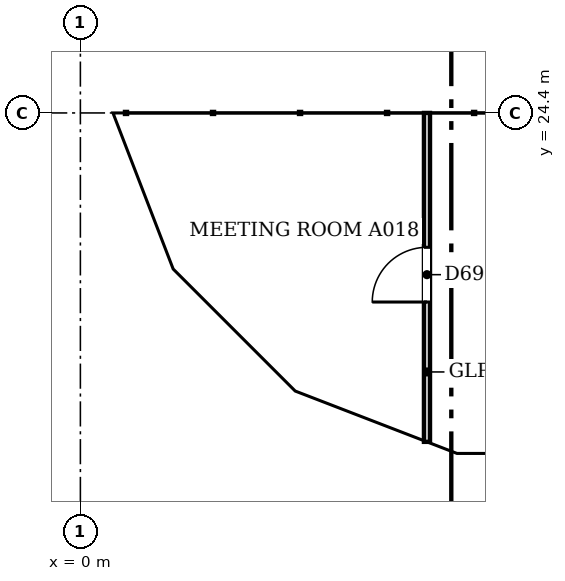
"""IFC4 building model, lengths in metres.
Left out: names, types, materials, properties, quantities, classifications, styles, units other than length and angle.
Written with IfcOpenShell. Run it as: python <this file> out.ifc"""

import sys

from ifc_helpers import new_model, si_unit, direction, frame, frame_2d, origin, place, context, subcontext, project, spatial, polyline, rectangle, outline, extrude, faceted_brep, source, transform, mapped, element, fill, save


model = new_model("IFC4")
c1 = context("Model", 3, precision=1e-05, world=origin(), true_north=direction((0.0, 1.0)))
c2 = subcontext(c1, "Body", "Model", "MODEL_VIEW")
j1 = project(units=[si_unit("LENGTHUNIT", "METRE"), si_unit("PLANEANGLEUNIT", "RADIAN")], contexts=[c1])
p1 = place(None, origin())
s1 = spatial("IfcSite", under=j1, at=p1, CompositionType="ELEMENT")
p2 = place(p1, origin())
s2 = spatial("IfcBuilding", under=s1, at=p2, CompositionType="ELEMENT")
p3 = place(p2, frame((0.0, 0.0, 112.6)))
s3 = spatial("IfcBuildingStorey", under=s2, at=p3, CompositionType="ELEMENT", Elevation=112.6)
m1 = source(origin(), c2, "Body", "Brep", [
    faceted_brep([(6.053, -0.25, 0.0), (3.05, -0.25, 3.8), (0.0, -0.25, 0.0), (0.0, 0.25, 0.0), (3.05, 0.25, 3.8), (6.007, 0.25, 0.059), (6.007, 0.25, 0.0), (6.053, 0.0, 0.0)], [[[0, 1, 2]], [[3, 4, 5, 6]], [[5, 4, 1, 0, 7]], [[4, 3, 2, 1]], [[3, 6, 7, 0, 2]], [[7, 6, 5]]]),
])
p4 = place(p3, frame((0.25, 30.5, 0.0), z_axis=(0.0, 0.0, 1.0), x_axis=(0.0, -1.0, 0.0)))
e1 = element("IfcWall", 1, at=p4, inside=s3, PredefinedType="SOLIDWALL", context=c2, shape_type="MappedRepresentation", body=[
    mapped(m1, transform((0.0, 0.0, 0.0), scale=1.0)),
])
m2 = source(origin(), c2, "Body", "SweptSolid", [
    extrude(outline(polyline([(5.537, 0.25), (3.049, 3.399), (0.521, 0.25), (5.537, 0.25)])), frame((0.0, 0.26, 0.0), z_axis=(0.0, -1.0, 0.0), x_axis=(1.0, 0.0, 0.0)), (0.0, 0.0, 1.0), 0.52),
])
p5 = place(p4, origin())
e2 = element("IfcOpeningElement", 2, at=p5, cuts=e1, PredefinedType="OPENING", context=c2, shape_type="MappedRepresentation", body=[
    mapped(m2, transform((0.0, 0.0, 0.0), scale=1.0)),
])
m3 = source(origin(), c2, "Body", "Brep", [
    faceted_brep([(3.003, -0.25, 3.731), (2.95, -0.25, 3.8), (0.0, -0.25, 0.0), (3.003, -0.25, 0.0), (0.047, 0.25, 0.06), (2.898, 0.25, 3.732), (2.898, 0.25, 0.0), (0.047, 0.25, 0.0), (2.95, 0.0, 3.8), (0.0, 0.0, 0.0)], [[[0, 1, 2, 3]], [[4, 5, 6, 7]], [[8, 1, 0]], [[5, 4, 9, 2, 1, 8]], [[7, 6, 3, 2, 9]], [[7, 9, 4]], [[3, 6, 5, 8, 0]]]),
])
p6 = place(p3, frame((0.25, 24.447, 0.0), z_axis=(0.0, 0.0, 1.0), x_axis=(0.35992665181, -0.932980602862, 0.0)))
e3 = element("IfcWall", 3, at=p6, inside=s3, PredefinedType="SOLIDWALL", context=c2, shape_type="MappedRepresentation", body=[
    mapped(m3, transform((0.0, 0.0, 0.0), scale=1.0)),
])
m4 = source(origin(), c2, "Body", "SweptSolid", [
    extrude(outline(polyline([(2.75, 3.135), (0.511, 0.25), (2.75, 0.25), (2.75, 3.135)])), frame((0.0, 0.26, 0.0), z_axis=(0.0, -1.0, 0.0), x_axis=(1.0, 0.0, 0.0)), (0.0, 0.0, 1.0), 0.52),
])
p7 = place(p6, origin())
e4 = element("IfcOpeningElement", 4, at=p7, cuts=e3, PredefinedType="OPENING", context=c2, shape_type="MappedRepresentation", body=[
    mapped(m4, transform((0.0, 0.0, 0.0), scale=1.0)),
])
m5 = source(origin(), c2, "Body", "Brep", [
    faceted_brep([(2.997, -0.25, 0.0), (0.053, -0.25, 3.8), (0.0, -0.25, 3.732), (0.0, -0.25, 0.0), (0.106, 0.25, 3.731), (2.944, 0.25, 0.068), (2.944, 0.25, 0.0), (0.106, 0.25, 0.0), (0.053, 0.0, 3.8), (2.997, 0.0, 0.0)], [[[0, 1, 2, 3]], [[4, 5, 6, 7]], [[5, 4, 8, 1, 0, 9]], [[2, 1, 8]], [[7, 6, 9, 0, 3]], [[7, 3, 2, 8, 4]], [[9, 6, 5]]]),
])
p8 = place(p3, frame((1.274, 21.731, 0.0), z_axis=(0.0, 0.0, 1.0), x_axis=(0.707147509625, -0.707066050402, 0.0)))
e5 = element("IfcWall", 5, at=p8, inside=s3, PredefinedType="SOLIDWALL", context=c2, shape_type="MappedRepresentation", body=[
    mapped(m5, transform((0.0, 0.0, 0.0), scale=1.0)),
])
m6 = source(origin(), c2, "Body", "SweptSolid", [
    extrude(outline(polyline([(2.487, 0.25), (0.253, 3.134), (0.253, 0.25), (2.487, 0.25)])), frame((0.0, 0.26, 0.0), z_axis=(0.0, -1.0, 0.0), x_axis=(1.0, 0.0, 0.0)), (0.0, 0.0, 1.0), 0.52),
])
p9 = place(p8, origin())
e6 = element("IfcOpeningElement", 6, at=p9, cuts=e5, PredefinedType="OPENING", context=c2, shape_type="MappedRepresentation", body=[
    mapped(m6, transform((0.0, 0.0, 0.0), scale=1.0)),
])
m7 = source(origin(), c2, "Body", "Brep", [
    faceted_brep([(2.997, -0.25, 3.741), (2.95, -0.25, 3.8), (0.0, -0.25, 0.0), (2.997, -0.25, 0.0), (0.053, 0.25, 0.068), (2.904, 0.25, 3.74), (2.904, 0.25, 0.0), (0.053, 0.25, 0.0), (2.95, 0.0, 3.8), (0.0, 0.0, 0.0)], [[[0, 1, 2, 3]], [[4, 5, 6, 7]], [[8, 1, 0]], [[5, 4, 9, 2, 1, 8]], [[7, 6, 3, 2, 9]], [[7, 9, 4]], [[3, 6, 5, 8, 0]]]),
])
p10 = place(p3, frame((3.394, 19.612, 0.0), z_axis=(0.0, 0.0, 1.0), x_axis=(0.932990326376, -0.359901446078, 0.0)))
e7 = element("IfcWall", 7, at=p10, inside=s3, PredefinedType="SOLIDWALL", context=c2, shape_type="MappedRepresentation", body=[
    mapped(m7, transform((0.0, 0.0, 0.0), scale=1.0)),
])
p11 = place(p10, origin())
e8 = element("IfcOpeningElement", 8, at=p11, cuts=e7, PredefinedType="OPENING", context=c2, shape_type="MappedRepresentation", body=[
    mapped(m4, transform((0.0, 0.0, 0.0), scale=1.0)),
])
m8 = source(origin(), c2, "Body", "Brep", [
    faceted_brep([(3.05, -0.25, 0.0), (0.047, -0.25, 3.8), (0.0, -0.25, 3.74), (0.0, -0.25, 0.0), (0.093, 0.25, 3.741), (3.05, 0.25, 0.0), (0.093, 0.25, 0.0), (0.047, 0.0, 3.8)], [[[0, 1, 2, 3]], [[4, 5, 6]], [[5, 4, 7, 1, 0]], [[2, 1, 7]], [[6, 5, 0, 3]], [[6, 3, 2, 7, 4]]]),
])
p12 = place(p3, frame((6.1, 18.55, 0.0), z_axis=(0.0, 0.0, 1.0), x_axis=(1.0, 0.0, 0.0)))
e9 = element("IfcWall", 9, at=p12, inside=s3, PredefinedType="SOLIDWALL", context=c2, shape_type="MappedRepresentation", body=[
    mapped(m8, transform((0.0, 0.0, 0.0), scale=1.0)),
])
m9 = source(origin(), c2, "Body", "SweptSolid", [
    extrude(outline(polyline([(2.534, 0.25), (0.247, 3.144), (0.247, 0.25), (2.534, 0.25)])), frame((0.0, 0.26, 0.0), z_axis=(0.0, -1.0, 0.0), x_axis=(1.0, 0.0, 0.0)), (0.0, 0.0, 1.0), 0.52),
])
p13 = place(p12, origin())
e10 = element("IfcOpeningElement", 10, at=p13, cuts=e9, PredefinedType="OPENING", context=c2, shape_type="MappedRepresentation", body=[
    mapped(m9, transform((0.0, 0.0, 0.0), scale=1.0)),
])
p14 = place(p2, frame((0.0, 0.0, 116.4)))
s4 = spatial("IfcBuildingStorey", under=s2, at=p14, CompositionType="ELEMENT", Elevation=116.4)
m10 = source(origin(), c2, "Body", "Brep", [
    faceted_brep([(3.003, -0.25, 0.0), (3.05, -0.25, 0.06), (3.05, -0.25, 7.54), (3.003, -0.25, 7.6), (0.0, -0.25, 3.8), (0.0, 0.25, 3.8), (2.957, 0.25, 7.541), (2.957, 0.25, 0.059), (3.003, 0.0, 0.0), (3.003, 0.0, 7.6)], [[[0, 1, 2, 3, 4]], [[5, 6, 7]], [[1, 0, 8]], [[9, 3, 2]], [[6, 5, 4, 3, 9]], [[5, 7, 8, 0, 4]], [[1, 8, 7, 6, 9, 2]]]),
])
p15 = place(p14, frame((0.25, 27.45, -3.8), z_axis=(0.0, 0.0, 1.0), x_axis=(0.0, -1.0, 0.0)))
e11 = element("IfcWall", 11, at=p15, inside=s4, PredefinedType="SOLIDWALL", context=c2, shape_type="MappedRepresentation", body=[
    mapped(m10, transform((0.0, 0.0, 0.0), scale=1.0)),
])
m11 = source(origin(), c2, "Body", "SweptSolid", [
    extrude(outline(polyline([(2.803, 6.944), (0.319, 3.8), (2.803, 0.656), (2.803, 6.944)])), frame((0.0, 0.26, 0.0), z_axis=(0.0, -1.0, 0.0), x_axis=(1.0, 0.0, 0.0)), (0.0, 0.0, 1.0), 0.52),
])
p16 = place(p15, origin())
e12 = element("IfcOpeningElement", 12, at=p16, cuts=e11, PredefinedType="OPENING", context=c2, shape_type="MappedRepresentation", body=[
    mapped(m11, transform((0.0, 0.0, 0.0), scale=1.0)),
])
m12 = source(origin(), c2, "Body", "Brep", [
    faceted_brep([(0.047, -0.25, 0.0), (2.997, -0.25, 3.8), (0.047, -0.25, 7.6), (0.0, -0.25, 7.541), (0.0, -0.25, 0.059), (0.093, 0.25, 7.54), (2.944, 0.25, 3.868), (2.944, 0.25, 3.732), (0.093, 0.25, 0.06), (2.997, 0.0, 3.8), (0.047, 0.0, 0.0), (0.047, 0.0, 7.6)], [[[0, 1, 2, 3, 4]], [[5, 6, 7, 8]], [[8, 7, 9, 1, 0, 10]], [[6, 5, 11, 2, 1, 9]], [[3, 2, 11]], [[10, 0, 4]], [[8, 10, 4, 3, 11, 5]], [[9, 7, 6]]]),
])
p17 = place(p14, frame((0.233, 24.49, -3.8), z_axis=(0.0, 0.0, 1.0), x_axis=(0.359901446078, -0.932990326376, 0.0)))
e13 = element("IfcWall", 13, at=p17, inside=s4, PredefinedType="SOLIDWALL", context=c2, shape_type="MappedRepresentation", body=[
    mapped(m12, transform((0.0, 0.0, 0.0), scale=1.0)),
])
m13 = source(origin(), c2, "Body", "SweptSolid", [
    extrude(outline(polyline([(0.247, 0.665), (2.681, 3.8), (0.247, 6.935), (0.247, 0.665)])), frame((0.0, 0.26, 0.0), z_axis=(0.0, -1.0, 0.0), x_axis=(1.0, 0.0, 0.0)), (0.0, 0.0, 1.0), 0.52),
])
p18 = place(p17, origin())
e14 = element("IfcOpeningElement", 14, at=p18, cuts=e13, PredefinedType="OPENING", context=c2, shape_type="MappedRepresentation", body=[
    mapped(m13, transform((0.0, 0.0, 0.0), scale=1.0)),
])
m14 = source(origin(), c2, "Body", "Brep", [
    faceted_brep([(2.944, -0.25, 0.0), (2.997, -0.25, 0.068), (2.997, -0.25, 7.532), (2.944, -0.25, 7.6), (0.0, -0.25, 3.8), (0.053, 0.25, 3.868), (2.891, 0.25, 7.532), (2.891, 0.25, 0.068), (0.053, 0.25, 3.731), (2.944, 0.0, 0.0), (2.944, 0.0, 7.6), (0.0, 0.0, 3.8)], [[[0, 1, 2, 3, 4]], [[5, 6, 7, 8]], [[1, 0, 9]], [[10, 3, 2]], [[6, 5, 11, 4, 3, 10]], [[8, 7, 9, 0, 4, 11]], [[8, 11, 5]], [[1, 9, 7, 6, 10, 2]]]),
])
p19 = place(p14, frame((1.312, 21.694, -3.8), z_axis=(0.0, 0.0, 1.0), x_axis=(0.707066050402, -0.707147509625, 0.0)))
e15 = element("IfcWall", 15, at=p19, inside=s4, PredefinedType="SOLIDWALL", context=c2, shape_type="MappedRepresentation", body=[
    mapped(m14, transform((0.0, 0.0, 0.0), scale=1.0)),
])
m15 = source(origin(), c2, "Body", "SweptSolid", [
    extrude(outline(polyline([(2.744, 6.934), (0.316, 3.8), (2.744, 0.666), (2.744, 6.934)])), frame((0.0, 0.26, 0.0), z_axis=(0.0, -1.0, 0.0), x_axis=(1.0, 0.0, 0.0)), (0.0, 0.0, 1.0), 0.52),
])
p20 = place(p19, origin())
e16 = element("IfcOpeningElement", 16, at=p20, cuts=e15, PredefinedType="OPENING", context=c2, shape_type="MappedRepresentation", body=[
    mapped(m15, transform((0.0, 0.0, 0.0), scale=1.0)),
])
m16 = source(origin(), c2, "Body", "Brep", [
    faceted_brep([(0.053, -0.25, 0.0), (3.003, -0.25, 3.8), (0.053, -0.25, 7.6), (0.0, -0.25, 7.531), (0.0, -0.25, 0.068), (0.106, 0.25, 7.532), (2.957, 0.25, 3.86), (2.957, 0.25, 3.74), (0.106, 0.25, 0.068), (3.003, 0.0, 3.8), (0.053, 0.0, 0.0), (0.053, 0.0, 7.6)], [[[0, 1, 2, 3, 4]], [[5, 6, 7, 8]], [[8, 7, 9, 1, 0, 10]], [[6, 5, 11, 2, 1, 9]], [[3, 2, 11]], [[10, 0, 4]], [[8, 10, 4, 3, 11, 5]], [[9, 7, 6]]]),
])
p21 = place(p14, frame((3.344, 19.631, -3.8), z_axis=(0.0, 0.0, 1.0), x_axis=(0.933007896601, -0.359855894603, 0.0)))
e17 = element("IfcWall", 17, at=p21, inside=s4, PredefinedType="SOLIDWALL", context=c2, shape_type="MappedRepresentation", body=[
    mapped(m16, transform((0.0, 0.0, 0.0), scale=1.0)),
])
m17 = source(origin(), c2, "Body", "SweptSolid", [
    extrude(outline(polyline([(0.253, 0.665), (2.687, 3.8), (0.253, 6.935), (0.253, 0.665)])), frame((0.0, 0.26, 0.0), z_axis=(0.0, -1.0, 0.0), x_axis=(1.0, 0.0, 0.0)), (0.0, 0.0, 1.0), 0.52),
])
p22 = place(p21, origin())
e18 = element("IfcOpeningElement", 18, at=p22, cuts=e17, PredefinedType="OPENING", context=c2, shape_type="MappedRepresentation", body=[
    mapped(m17, transform((0.0, 0.0, 0.0), scale=1.0)),
])
m18 = source(origin(), c2, "Body", "Brep", [
    faceted_brep([(3.003, -0.25, 0.0), (6.053, -0.25, 3.8), (3.003, -0.25, 7.6), (0.0, -0.25, 3.8), (0.047, 0.25, 3.859), (3.003, 0.25, 7.6), (6.053, 0.25, 3.8), (3.003, 0.25, 0.0), (0.047, 0.25, 3.741), (0.0, 0.0, 3.8)], [[[0, 1, 2, 3]], [[4, 5, 6, 7, 8]], [[7, 6, 1, 0]], [[6, 5, 2, 1]], [[5, 4, 9, 3, 2]], [[8, 7, 0, 3, 9]], [[8, 9, 4]]]),
])
p23 = place(p14, frame((6.146, 18.55, -3.8), z_axis=(0.0, 0.0, 1.0), x_axis=(1.0, 0.0, 0.0)))
e19 = element("IfcWall", 19, at=p23, inside=s4, PredefinedType="SOLIDWALL", context=c2, shape_type="MappedRepresentation", body=[
    mapped(m18, transform((0.0, 0.0, 0.0), scale=1.0)),
])
m19 = source(origin(), c2, "Body", "SweptSolid", [
    extrude(outline(polyline([(3.005, 0.401), (5.733, 3.8), (3.005, 7.199), (0.319, 3.8), (3.005, 0.401)])), frame((0.0, 0.26, 0.0), z_axis=(0.0, -1.0, 0.0), x_axis=(1.0, 0.0, 0.0)), (0.0, 0.0, 1.0), 0.52),
])
p24 = place(p23, origin())
e20 = element("IfcOpeningElement", 20, at=p24, cuts=e19, PredefinedType="OPENING", context=c2, shape_type="MappedRepresentation", body=[
    mapped(m19, transform((0.0, 0.0, 0.0), scale=1.0)),
])
p25 = place(p3, frame((5.7, 18.99, 0.0), z_axis=(0.0, 0.0, 1.0), x_axis=(0.0, 1.0, 0.0)))
e21 = element("IfcWall", 21, at=p25, inside=s3, PredefinedType="PARTITIONING", context=c2, shape_type="SweptSolid", body=[
    extrude(rectangle(XDim=5.41, YDim=0.1, at=frame_2d((2.705, 0.0))), origin(), (0.0, 0.0, 1.0), 3.067),
])
m20 = source(origin(), c2, "Body", "SweptSolid", [
    extrude(rectangle(XDim=0.9, YDim=2.1, at=frame_2d((0.45, 1.05))), frame((0.0, 0.06, 0.0), z_axis=(0.0, -1.0, 0.0), x_axis=(1.0, 0.0, 0.0)), (0.0, 0.0, 1.0), 0.12),
])
p26 = place(p25, frame((2.3, 0.0, 0.0)))
e22 = element("IfcOpeningElement", 22, at=p26, cuts=e21, PredefinedType="OPENING", context=c2, shape_type="MappedRepresentation", body=[
    mapped(m20, transform((0.0, 0.0, 0.0), scale=1.0)),
])
m21 = source(origin(), c2, "Body", "SweptSolid", [
    extrude(rectangle(XDim=0.9, YDim=2.1, at=frame_2d((0.45, 1.05))), frame((0.0, 0.025, 0.0), z_axis=(0.0, -1.0, 0.0), x_axis=(1.0, 0.0, 0.0)), (0.0, 0.0, 1.0), 0.05),
])
p27 = place(p26, origin())
e23 = element("IfcDoor", 23, at=p27, inside=s3, OperationType="SINGLE_SWING_LEFT", PredefinedType="DOOR", context=c2, shape_type="MappedRepresentation", body=[
    mapped(m21, transform((0.0, 0.0, 0.0), scale=1.0)),
])
fill(e22, e23)
save(model, sys.argv[1])
